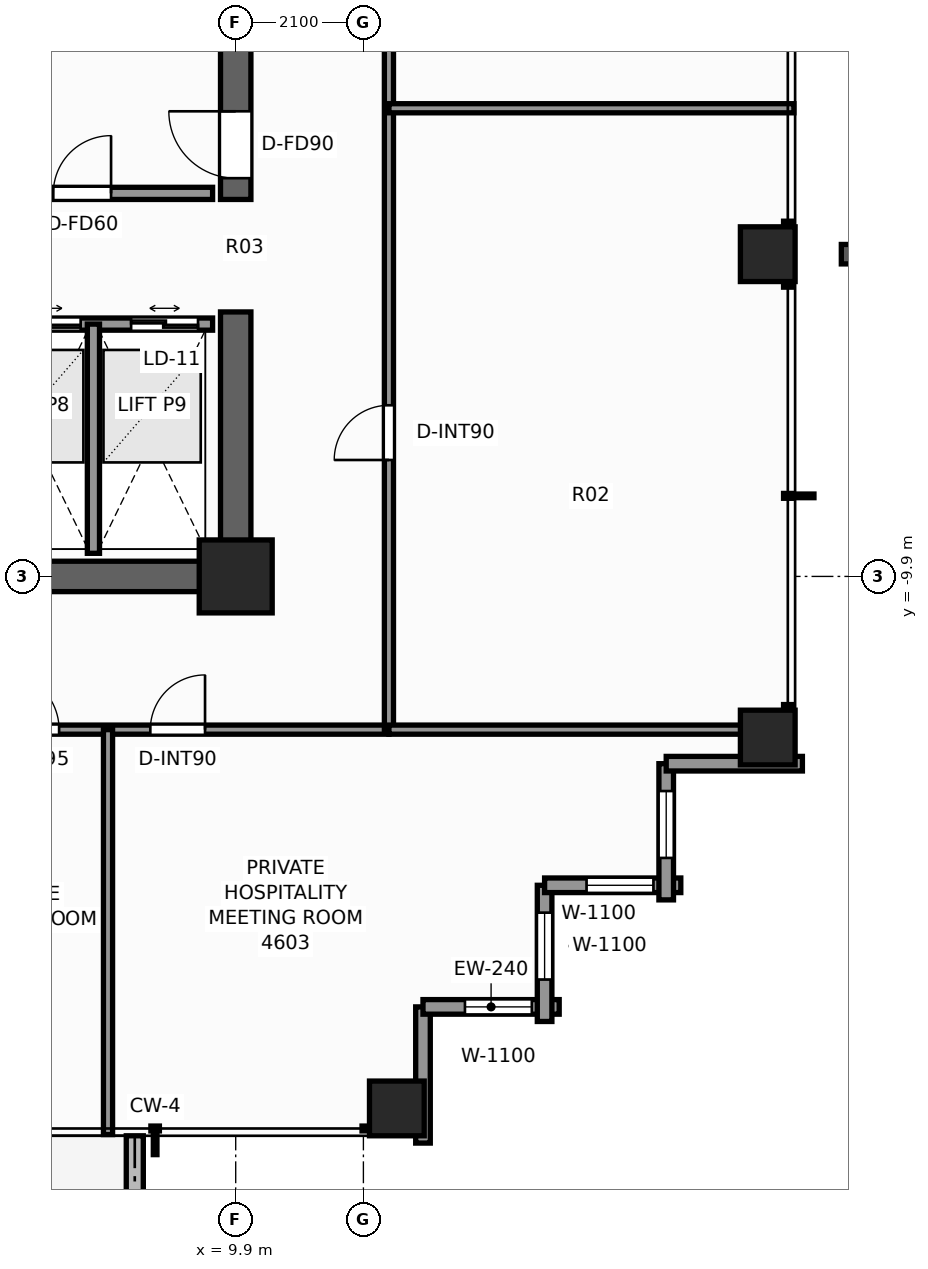
"""IFC4 building model, lengths in metres.
Left out: names, types, materials, properties, quantities, classifications, styles, units other than length and angle.
Written with IfcOpenShell. Run it as: python <this file> out.ifc"""

import sys

from ifc_helpers import new_model, si_unit, direction, frame, frame_2d, origin, origin_2d, place, context, subcontext, project, spatial, rectangle, extrude, element, fill, save


model = new_model("IFC4")
c1 = context("Model", 3, precision=1e-05, world=origin(), true_north=direction((0.0, 1.0)))
c2 = subcontext(c1, "Body", "Model", "MODEL_VIEW")
j1 = project(units=[si_unit("LENGTHUNIT", "METRE"), si_unit("PLANEANGLEUNIT", "RADIAN")], contexts=[c1])
p1 = place(None, origin())
s1 = spatial("IfcSite", under=j1, at=p1, CompositionType="ELEMENT")
p2 = place(p1, origin())
s2 = spatial("IfcBuilding", under=s1, at=p2, CompositionType="ELEMENT")
p3 = place(p2, frame((0.0, 0.0, 160.2)))
s3 = spatial("IfcBuildingStorey", under=s2, at=p3, CompositionType="ELEMENT", Elevation=160.2)
p4 = place(p3, frame((10.15, -9.9, 0.0), z_axis=(0.0, 0.0, 1.0), x_axis=(-1.0, 0.0, 0.0)))
e1 = element("IfcWall", 1, at=p4, inside=s3, PredefinedType="SHEAR", context=c2, shape_type="SweptSolid", body=[
    extrude(rectangle(XDim=12.01, YDim=0.5, at=frame_2d((6.005, 0.0))), origin(), (0.0, 0.0, 1.0), 3.3),
])
p5 = place(p3, frame((9.9, -9.65, 0.0), z_axis=(0.0, 0.0, 1.0), x_axis=(0.0, 1.0, 0.0)))
e2 = element("IfcWall", 2, at=p5, inside=s3, PredefinedType="SHEAR", context=c2, shape_type="SweptSolid", body=[
    extrude(rectangle(XDim=4.1, YDim=0.5, at=frame_2d((2.05, 0.0))), origin(), (0.0, 0.0, 1.0), 3.3),
])
p6 = place(p3, frame((9.9, -3.7, 0.0), z_axis=(0.0, 0.0, 1.0), x_axis=(0.0, 1.0, 0.0)))
e3 = element("IfcWall", 3, at=p6, inside=s3, PredefinedType="SHEAR", context=c2, shape_type="SweptSolid", body=[
    extrude(rectangle(XDim=13.35, YDim=0.5, at=frame_2d((6.675, 0.0))), origin(), (0.0, 0.0, 1.0), 3.3),
])
p7 = place(p6, frame((0.35, 0.0, 0.0)))
e4 = element("IfcOpeningElement", 4, at=p7, cuts=e3, PredefinedType="OPENING", context=c2, shape_type="SweptSolid", body=[
    extrude(rectangle(XDim=1.1, YDim=2.2, at=frame_2d((0.55, 1.1))), frame((0.0, 0.26, 0.0), z_axis=(0.0, -1.0, 0.0), x_axis=(1.0, 0.0, 0.0)), (0.0, 0.0, 1.0), 0.52),
])
p8 = place(p3, frame((9.9, -9.9, 0.0), z_axis=(0.0, 0.0, 1.0), x_axis=(1.0, 0.0, 0.0)))
e5 = element("IfcColumn", 5, at=p8, inside=s3, PredefinedType="COLUMN", context=c2, shape_type="SweptSolid", body=[
    extrude(rectangle(XDim=1.2, YDim=1.2, at=origin_2d()), origin(), (0.0, 0.0, 1.0), 3.3),
])
for number, where, z_axis, x_axis in (
    (6, (12.55, -18.65, 0.0), (0.0, 0.0, 1.0), (1.0, 0.0, 0.0)),
    (7, (18.65, -12.55, 0.0), (0.0, 0.0, 1.0), (1.0, 0.0, 0.0)),
    (8, (18.65, -4.6, 0.0), (0.0, 0.0, 1.0), (1.0, 0.0, 0.0)),
):
    element("IfcColumn", number, at=place(p3, frame(where, z_axis=z_axis, x_axis=x_axis)), inside=s3, PredefinedType="COLUMN", context=c2, shape_type="SweptSolid", body=[
        extrude(rectangle(XDim=0.9, YDim=0.9, at=origin_2d()), origin(), (0.0, 0.0, 1.0), 3.3),
    ])
p9 = place(p3, frame((8.24, -22.52, -0.02), z_axis=(0.0, 0.0, 1.0), x_axis=(0.0, 1.0, 0.0)))
e9 = element("IfcWall", 9, at=p9, inside=s3, PredefinedType="PARAPET", context=c2, shape_type="SweptSolid", body=[
    extrude(rectangle(XDim=3.42, YDim=0.28, at=frame_2d((1.71, 0.0))), origin(), (0.0, 0.0, 1.0), 0.42),
])
p10 = place(p3, frame((12.98, -16.98, 0.0), z_axis=(0.0, 0.0, 1.0), x_axis=(0.0, -1.0, 0.0)))
e10 = element("IfcWall", 10, at=p10, inside=s3, PredefinedType="STANDARD", context=c2, shape_type="SweptSolid", body=[
    extrude(rectangle(XDim=2.24, YDim=0.24, at=frame_2d((1.12, 0.0))), origin(), (0.0, 0.0, 1.0), 2.483),
])
p11 = place(p3, frame((15.22, -16.98, 0.0), z_axis=(0.0, 0.0, 1.0), x_axis=(-1.0, 0.0, 0.0)))
e11 = element("IfcWall", 11, at=p11, inside=s3, PredefinedType="STANDARD", context=c2, shape_type="SweptSolid", body=[
    extrude(rectangle(XDim=2.24, YDim=0.24, at=frame_2d((1.12, 0.0))), origin(), (0.0, 0.0, 1.0), 2.483),
])
p12 = place(p11, frame((0.45, 0.0, 0.65)))
e12 = element("IfcOpeningElement", 12, at=p12, cuts=e11, PredefinedType="OPENING", context=c2, shape_type="SweptSolid", body=[
    extrude(rectangle(XDim=1.1, YDim=1.45, at=frame_2d((0.55, 0.725))), frame((0.0, 0.13, 0.0), z_axis=(0.0, -1.0, 0.0), x_axis=(1.0, 0.0, 0.0)), (0.0, 0.0, 1.0), 0.26),
])
p13 = place(p3, frame((14.98, -14.98, 0.0), z_axis=(0.0, 0.0, 1.0), x_axis=(0.0, -1.0, 0.0)))
e13 = element("IfcWall", 13, at=p13, inside=s3, PredefinedType="STANDARD", context=c2, shape_type="SweptSolid", body=[
    extrude(rectangle(XDim=2.24, YDim=0.24, at=frame_2d((1.12, 0.0))), origin(), (0.0, 0.0, 1.0), 2.483),
])
p14 = place(p13, frame((0.45, 0.0, 0.65)))
e14 = element("IfcOpeningElement", 14, at=p14, cuts=e13, PredefinedType="OPENING", context=c2, shape_type="SweptSolid", body=[
    extrude(rectangle(XDim=1.1, YDim=1.45, at=frame_2d((0.55, 0.725))), frame((0.0, 0.13, 0.0), z_axis=(0.0, -1.0, 0.0), x_axis=(1.0, 0.0, 0.0)), (0.0, 0.0, 1.0), 0.26),
])
p15 = place(p3, frame((17.22, -14.98, 0.0), z_axis=(0.0, 0.0, 1.0), x_axis=(-1.0, 0.0, 0.0)))
e15 = element("IfcWall", 15, at=p15, inside=s3, PredefinedType="STANDARD", context=c2, shape_type="SweptSolid", body=[
    extrude(rectangle(XDim=2.24, YDim=0.24, at=frame_2d((1.12, 0.0))), origin(), (0.0, 0.0, 1.0), 2.483),
])
p16 = place(p15, frame((0.45, 0.0, 0.65)))
e16 = element("IfcOpeningElement", 16, at=p16, cuts=e15, PredefinedType="OPENING", context=c2, shape_type="SweptSolid", body=[
    extrude(rectangle(XDim=1.1, YDim=1.45, at=frame_2d((0.55, 0.725))), frame((0.0, 0.13, 0.0), z_axis=(0.0, -1.0, 0.0), x_axis=(1.0, 0.0, 0.0)), (0.0, 0.0, 1.0), 0.26),
])
p17 = place(p3, frame((16.98, -12.98, 0.0), z_axis=(0.0, 0.0, 1.0), x_axis=(0.0, -1.0, 0.0)))
e17 = element("IfcWall", 17, at=p17, inside=s3, PredefinedType="STANDARD", context=c2, shape_type="SweptSolid", body=[
    extrude(rectangle(XDim=2.24, YDim=0.24, at=frame_2d((1.12, 0.0))), origin(), (0.0, 0.0, 1.0), 2.483),
])
p18 = place(p17, frame((0.45, 0.0, 0.65)))
e18 = element("IfcOpeningElement", 18, at=p18, cuts=e17, PredefinedType="OPENING", context=c2, shape_type="SweptSolid", body=[
    extrude(rectangle(XDim=1.1, YDim=1.45, at=frame_2d((0.55, 0.725))), frame((0.0, 0.13, 0.0), z_axis=(0.0, -1.0, 0.0), x_axis=(1.0, 0.0, 0.0)), (0.0, 0.0, 1.0), 0.26),
])
p19 = place(p3, frame((19.22, -12.98, 0.0), z_axis=(0.0, 0.0, 1.0), x_axis=(-1.0, 0.0, 0.0)))
e19 = element("IfcWall", 19, at=p19, inside=s3, PredefinedType="STANDARD", context=c2, shape_type="SweptSolid", body=[
    extrude(rectangle(XDim=2.24, YDim=0.24, at=frame_2d((1.12, 0.0))), origin(), (0.0, 0.0, 1.0), 2.483),
])
p20 = place(p3, frame((5.75, -3.6, 0.0), z_axis=(0.0, 0.0, 1.0), x_axis=(1.0, 0.0, 0.0)))
e20 = element("IfcWall", 20, at=p20, inside=s3, PredefinedType="SOLIDWALL", context=c2, shape_type="SweptSolid", body=[
    extrude(rectangle(XDim=3.77, YDim=0.2, at=frame_2d((1.885, 0.0))), origin(), (0.0, 0.0, 1.0), 3.1),
])
p21 = place(p20, frame((1.15, 0.0, 0.0)))
e21 = element("IfcOpeningElement", 21, at=p21, cuts=e20, PredefinedType="OPENING", context=c2, shape_type="SweptSolid", body=[
    extrude(rectangle(XDim=0.95, YDim=2.06, at=frame_2d((0.475, 1.03))), frame((0.0, 0.11, 0.0), z_axis=(0.0, -1.0, 0.0), x_axis=(1.0, 0.0, 0.0)), (0.0, 0.0, 1.0), 0.22),
])
p22 = place(p3, frame((3.86, -5.75, 0.0), z_axis=(0.0, 0.0, 1.0), x_axis=(1.0, 0.0, 0.0)))
e22 = element("IfcWall", 22, at=p22, inside=s3, PredefinedType="SOLIDWALL", context=c2, shape_type="SweptSolid", body=[
    extrude(rectangle(XDim=5.66, YDim=0.2, at=frame_2d((2.83, 0.0))), origin(), (0.0, 0.0, 1.0), 3.1),
])
p23 = place(p22, frame((0.46, 0.0, 0.0)))
e23 = element("IfcOpeningElement", 23, at=p23, cuts=e22, PredefinedType="OPENING", context=c2, shape_type="SweptSolid", body=[
    extrude(rectangle(XDim=1.1, YDim=2.2, at=frame_2d((0.55, 1.1))), frame((0.0, 0.11, 0.0), z_axis=(0.0, -1.0, 0.0), x_axis=(1.0, 0.0, 0.0)), (0.0, 0.0, 1.0), 0.22),
])
p24 = place(p22, frame((2.39, 0.0, 0.0)))
e24 = element("IfcOpeningElement", 24, at=p24, cuts=e22, PredefinedType="OPENING", context=c2, shape_type="SweptSolid", body=[
    extrude(rectangle(XDim=1.1, YDim=2.2, at=frame_2d((0.55, 1.1))), frame((0.0, 0.11, 0.0), z_axis=(0.0, -1.0, 0.0), x_axis=(1.0, 0.0, 0.0)), (0.0, 0.0, 1.0), 0.22),
])
p25 = place(p22, frame((4.32, 0.0, 0.0)))
e25 = element("IfcOpeningElement", 25, at=p25, cuts=e22, PredefinedType="OPENING", context=c2, shape_type="SweptSolid", body=[
    extrude(rectangle(XDim=1.1, YDim=2.2, at=frame_2d((0.55, 1.1))), frame((0.0, 0.11, 0.0), z_axis=(0.0, -1.0, 0.0), x_axis=(1.0, 0.0, 0.0)), (0.0, 0.0, 1.0), 0.22),
])
p26 = place(p3, frame((7.56, -9.52, 0.0), z_axis=(0.0, 0.0, 1.0), x_axis=(0.0, 1.0, 0.0)))
e26 = element("IfcWall", 26, at=p26, inside=s3, PredefinedType="SOLIDWALL", context=c2, shape_type="SweptSolid", body=[
    extrude(rectangle(XDim=3.77, YDim=0.2, at=frame_2d((1.885, 0.0))), origin(), (0.0, 0.0, 1.0), 3.1),
])
p27 = place(p3, frame((-12.42, -12.42, 0.0), z_axis=(0.0, 0.0, 1.0), x_axis=(1.0, 0.0, 0.0)))
e27 = element("IfcWall", 27, at=p27, inside=s3, PredefinedType="PARTITIONING", context=c2, shape_type="SweptSolid", body=[
    extrude(rectangle(XDim=24.84, YDim=0.15, at=frame_2d((12.42, 0.0))), origin(), (0.0, 0.0, 1.0), 2.389),
])
p28 = place(p27, frame((3.024, 0.0, 0.0)))
e28 = element("IfcOpeningElement", 28, at=p28, cuts=e27, PredefinedType="OPENING", context=c2, shape_type="SweptSolid", body=[
    extrude(rectangle(XDim=0.9, YDim=2.06, at=frame_2d((0.45, 1.03))), frame((0.0, 0.085, 0.0), z_axis=(0.0, -1.0, 0.0), x_axis=(1.0, 0.0, 0.0)), (0.0, 0.0, 1.0), 0.17),
])
p29 = place(p27, frame((9.94, 0.0, 0.0)))
e29 = element("IfcOpeningElement", 29, at=p29, cuts=e27, PredefinedType="OPENING", context=c2, shape_type="SweptSolid", body=[
    extrude(rectangle(XDim=0.9, YDim=2.06, at=frame_2d((0.45, 1.03))), frame((0.0, 0.085, 0.0), z_axis=(0.0, -1.0, 0.0), x_axis=(1.0, 0.0, 0.0)), (0.0, 0.0, 1.0), 0.17),
])
p30 = place(p27, frame((15.224, 0.0, 0.0)))
e30 = element("IfcOpeningElement", 30, at=p30, cuts=e27, PredefinedType="OPENING", context=c2, shape_type="SweptSolid", body=[
    extrude(rectangle(XDim=0.9, YDim=2.06, at=frame_2d((0.45, 1.03))), frame((0.0, 0.085, 0.0), z_axis=(0.0, -1.0, 0.0), x_axis=(1.0, 0.0, 0.0)), (0.0, 0.0, 1.0), 0.17),
])
p31 = place(p27, frame((18.466, 0.0, 0.0)))
e31 = element("IfcOpeningElement", 31, at=p31, cuts=e27, PredefinedType="OPENING", context=c2, shape_type="SweptSolid", body=[
    extrude(rectangle(XDim=0.95, YDim=2.06, at=frame_2d((0.475, 1.03))), frame((0.0, 0.085, 0.0), z_axis=(0.0, -1.0, 0.0), x_axis=(1.0, 0.0, 0.0)), (0.0, 0.0, 1.0), 0.17),
])
p32 = place(p27, frame((20.916, 0.0, 0.0)))
e32 = element("IfcOpeningElement", 32, at=p32, cuts=e27, PredefinedType="OPENING", context=c2, shape_type="SweptSolid", body=[
    extrude(rectangle(XDim=0.9, YDim=2.06, at=frame_2d((0.45, 1.03))), frame((0.0, 0.085, 0.0), z_axis=(0.0, -1.0, 0.0), x_axis=(1.0, 0.0, 0.0)), (0.0, 0.0, 1.0), 0.17),
])
p33 = place(p3, frame((12.42, -12.42, 0.0), z_axis=(0.0, 0.0, 1.0), x_axis=(0.0, 1.0, 0.0)))
e33 = element("IfcWall", 33, at=p33, inside=s3, PredefinedType="PARTITIONING", context=c2, shape_type="SweptSolid", body=[
    extrude(rectangle(XDim=24.84, YDim=0.15, at=frame_2d((12.42, 0.0))), origin(), (0.0, 0.0, 1.0), 2.389),
])
p34 = place(p33, frame((4.435, 0.0, 0.0)))
e34 = element("IfcOpeningElement", 34, at=p34, cuts=e33, PredefinedType="OPENING", context=c2, shape_type="SweptSolid", body=[
    extrude(rectangle(XDim=0.9, YDim=2.06, at=frame_2d((0.45, 1.03))), frame((0.0, 0.085, 0.0), z_axis=(0.0, -1.0, 0.0), x_axis=(1.0, 0.0, 0.0)), (0.0, 0.0, 1.0), 0.17),
])
p35 = place(p33, frame((19.505, 0.0, 0.0)))
e35 = element("IfcOpeningElement", 35, at=p35, cuts=e33, PredefinedType="OPENING", context=c2, shape_type="SweptSolid", body=[
    extrude(rectangle(XDim=0.9, YDim=2.06, at=frame_2d((0.45, 1.03))), frame((0.0, 0.085, 0.0), z_axis=(0.0, -1.0, 0.0), x_axis=(1.0, 0.0, 0.0)), (0.0, 0.0, 1.0), 0.17),
])
p36 = place(p3, frame((12.42, -12.42, 0.0), z_axis=(0.0, 0.0, 1.0), x_axis=(1.0, 0.0, 0.0)))
e36 = element("IfcWall", 36, at=p36, inside=s3, PredefinedType="PARTITIONING", context=c2, shape_type="SweptSolid", body=[
    extrude(rectangle(XDim=6.66, YDim=0.15, at=frame_2d((3.33, 0.0))), origin(), (0.0, 0.0, 1.0), 2.389),
])
for number, where, z_axis, x_axis in (
    (37, (7.8, -19.08, 0.0), (0.0, 0.0, 1.0), (0.0, 1.0, 0.0)),
    (38, (12.42, -2.2, 0.0), (0.0, 0.0, 1.0), (1.0, 0.0, 0.0)),
):
    element("IfcWall", number, at=place(p3, frame(where, z_axis=z_axis, x_axis=x_axis)), inside=s3, PredefinedType="PARTITIONING", context=c2, shape_type="SweptSolid", body=[
        extrude(rectangle(XDim=6.66, YDim=0.15, at=frame_2d((3.33, 0.0))), origin(), (0.0, 0.0, 1.0), 2.473),
    ])
p37 = place(p12, origin())
e39 = element("IfcWindow", 39, at=p37, inside=s3, PartitioningType="SINGLE_PANEL", PredefinedType="WINDOW", context=c2, shape_type="SweptSolid", body=[
    extrude(rectangle(XDim=1.1, YDim=1.45, at=frame_2d((0.55, 0.725))), frame((0.0, 0.03, 0.0), z_axis=(0.0, -1.0, 0.0), x_axis=(1.0, 0.0, 0.0)), (0.0, 0.0, 1.0), 0.06),
])
fill(e12, e39)
p38 = place(p14, origin())
e40 = element("IfcWindow", 40, at=p38, inside=s3, PartitioningType="SINGLE_PANEL", PredefinedType="WINDOW", context=c2, shape_type="SweptSolid", body=[
    extrude(rectangle(XDim=1.1, YDim=1.45, at=frame_2d((0.55, 0.725))), frame((0.0, 0.03, 0.0), z_axis=(0.0, -1.0, 0.0), x_axis=(1.0, 0.0, 0.0)), (0.0, 0.0, 1.0), 0.06),
])
fill(e14, e40)
p39 = place(p16, origin())
e41 = element("IfcWindow", 41, at=p39, inside=s3, PartitioningType="SINGLE_PANEL", PredefinedType="WINDOW", context=c2, shape_type="SweptSolid", body=[
    extrude(rectangle(XDim=1.1, YDim=1.45, at=frame_2d((0.55, 0.725))), frame((0.0, 0.03, 0.0), z_axis=(0.0, -1.0, 0.0), x_axis=(1.0, 0.0, 0.0)), (0.0, 0.0, 1.0), 0.06),
])
fill(e16, e41)
p40 = place(p18, origin())
e42 = element("IfcWindow", 42, at=p40, inside=s3, PartitioningType="SINGLE_PANEL", PredefinedType="WINDOW", context=c2, shape_type="SweptSolid", body=[
    extrude(rectangle(XDim=1.1, YDim=1.45, at=frame_2d((0.55, 0.725))), frame((0.0, 0.03, 0.0), z_axis=(0.0, -1.0, 0.0), x_axis=(1.0, 0.0, 0.0)), (0.0, 0.0, 1.0), 0.06),
])
fill(e18, e42)
p41 = place(p7, origin())
e43 = element("IfcDoor", 43, at=p41, inside=s3, OperationType="SINGLE_SWING_RIGHT", PredefinedType="DOOR", context=c2, shape_type="SweptSolid", body=[
    extrude(rectangle(XDim=1.1, YDim=2.2, at=frame_2d((0.55, 1.1))), frame((0.0, 0.025, 0.0), z_axis=(0.0, -1.0, 0.0), x_axis=(1.0, 0.0, 0.0)), (0.0, 0.0, 1.0), 0.05),
])
fill(e4, e43)
p42 = place(p24, origin())
e44 = element("IfcDoor", 44, at=p42, inside=s3, OperationType="DOUBLE_DOOR_SLIDING", PredefinedType="DOOR", context=c2, shape_type="SweptSolid", body=[
    extrude(rectangle(XDim=1.1, YDim=2.2, at=frame_2d((0.55, 1.1))), frame((0.0, 0.025, 0.0), z_axis=(0.0, -1.0, 0.0), x_axis=(1.0, 0.0, 0.0)), (0.0, 0.0, 1.0), 0.05),
])
fill(e24, e44)
p43 = place(p25, origin())
e45 = element("IfcDoor", 45, at=p43, inside=s3, OperationType="DOUBLE_DOOR_SLIDING", PredefinedType="DOOR", context=c2, shape_type="SweptSolid", body=[
    extrude(rectangle(XDim=1.1, YDim=2.2, at=frame_2d((0.55, 1.1))), frame((0.0, 0.025, 0.0), z_axis=(0.0, -1.0, 0.0), x_axis=(1.0, 0.0, 0.0)), (0.0, 0.0, 1.0), 0.05),
])
fill(e25, e45)
p44 = place(p21, origin())
e46 = element("IfcDoor", 46, at=p44, inside=s3, OperationType="SINGLE_SWING_RIGHT", PredefinedType="DOOR", context=c2, shape_type="SweptSolid", body=[
    extrude(rectangle(XDim=0.95, YDim=2.06, at=frame_2d((0.475, 1.03))), frame((0.0, 0.025, 0.0), z_axis=(0.0, -1.0, 0.0), x_axis=(1.0, 0.0, 0.0)), (0.0, 0.0, 1.0), 0.05),
])
fill(e21, e46)
p45 = place(p31, origin())
e47 = element("IfcDoor", 47, at=p45, inside=s3, OperationType="SINGLE_SWING_LEFT", PredefinedType="DOOR", context=c2, shape_type="SweptSolid", body=[
    extrude(rectangle(XDim=0.95, YDim=2.06, at=frame_2d((0.475, 1.03))), frame((0.0, 0.025, 0.0), z_axis=(0.0, -1.0, 0.0), x_axis=(1.0, 0.0, 0.0)), (0.0, 0.0, 1.0), 0.05),
])
fill(e31, e47)
p46 = place(p32, origin())
e48 = element("IfcDoor", 48, at=p46, inside=s3, OperationType="SINGLE_SWING_RIGHT", PredefinedType="DOOR", context=c2, shape_type="SweptSolid", body=[
    extrude(rectangle(XDim=0.9, YDim=2.06, at=frame_2d((0.45, 1.03))), frame((0.0, 0.025, 0.0), z_axis=(0.0, -1.0, 0.0), x_axis=(1.0, 0.0, 0.0)), (0.0, 0.0, 1.0), 0.05),
])
fill(e32, e48)
p47 = place(p34, origin())
e49 = element("IfcDoor", 49, at=p47, inside=s3, OperationType="SINGLE_SWING_LEFT", PredefinedType="DOOR", context=c2, shape_type="SweptSolid", body=[
    extrude(rectangle(XDim=0.9, YDim=2.06, at=frame_2d((0.45, 1.03))), frame((0.0, 0.025, 0.0), z_axis=(0.0, -1.0, 0.0), x_axis=(1.0, 0.0, 0.0)), (0.0, 0.0, 1.0), 0.05),
])
fill(e34, e49)
save(model, sys.argv[1])
